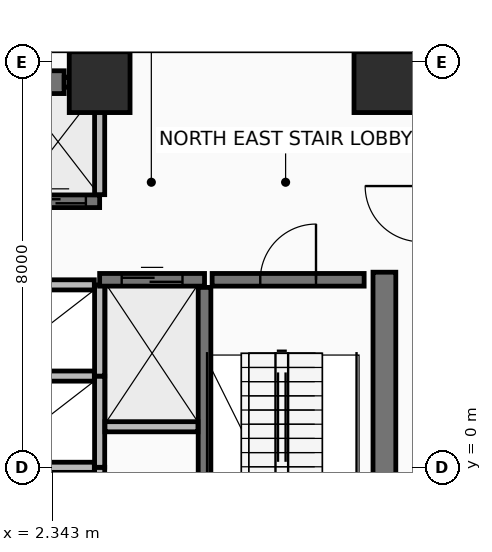
"""IFC4 building model, lengths in metres.
Left out: names, types, materials, properties, quantities, classifications, styles, units other than length and angle.
Written with IfcOpenShell. Run it as: python <this file> out.ifc"""

import sys

from ifc_helpers import new_model, si_unit, direction, frame, frame_2d, origin, origin_2d, place, context, subcontext, project, spatial, rectangle, extrude, element, fill, save


model = new_model("IFC4")
c1 = context("Model", 3, precision=1e-05, world=origin(), true_north=direction((0.0, 1.0)))
c2 = subcontext(c1, "Body", "Model", "MODEL_VIEW")
j1 = project(units=[si_unit("LENGTHUNIT", "METRE"), si_unit("PLANEANGLEUNIT", "RADIAN")], contexts=[c1])
p1 = place(None, origin())
s1 = spatial("IfcSite", under=j1, at=p1, CompositionType="ELEMENT")
p2 = place(p1, origin())
s2 = spatial("IfcBuilding", under=s1, at=p2, CompositionType="ELEMENT")
p3 = place(p2, frame((0.0, 0.0, 138.8)))
s3 = spatial("IfcBuildingStorey", under=s2, at=p3, CompositionType="ELEMENT", Elevation=138.8)
for number, where, z_axis, x_axis in (
    (1, (8.9, 7.6, 0.0), (0.0, 0.0, 1.0), (1.0, 0.0, 0.0)),
    (2, (3.28, 7.6, 0.0), (0.0, 0.0, 1.0), (1.0, 0.0, 0.0)),
):
    element("IfcColumn", number, at=place(p3, frame(where, z_axis=z_axis, x_axis=x_axis)), inside=s3, PredefinedType="COLUMN", context=c2, shape_type="SweptSolid", body=[
        extrude(rectangle(XDim=1.2, YDim=1.2, at=origin_2d()), origin(), (0.0, 0.0, 1.0), 3.6),
    ])
p4 = place(p3, frame((-2.8, 7.6, 0.0), z_axis=(0.0, 0.0, 1.0), x_axis=(1.0, 0.0, 0.0)))
e3 = element("IfcWall", 3, at=p4, inside=s3, PredefinedType="SHEAR", context=c2, shape_type="SweptSolid", body=[
    extrude(rectangle(XDim=5.38, YDim=0.45, at=frame_2d((2.69, 0.0))), origin(), (0.0, 0.0, 1.0), 3.41),
])
p5 = place(p3, frame((8.9, -6.85, 0.0), z_axis=(0.0, 0.0, 1.0), x_axis=(0.0, 1.0, 0.0)))
e4 = element("IfcWall", 4, at=p5, inside=s3, PredefinedType="SHEAR", context=c2, shape_type="SweptSolid", body=[
    extrude(rectangle(XDim=10.7, YDim=0.45, at=frame_2d((5.35, 0.0))), origin(), (0.0, 0.0, 1.0), 3.41),
])
p6 = place(p3, frame((5.35, -3.75, 0.0), z_axis=(0.0, 0.0, 1.0), x_axis=(0.0, 1.0, 0.0)))
e5 = element("IfcWall", 5, at=p6, inside=s3, PredefinedType="SHEAR", context=c2, shape_type="SweptSolid", body=[
    extrude(rectangle(XDim=7.3, YDim=0.25, at=frame_2d((3.65, 0.0))), origin(), (0.0, 0.0, 1.0), 3.41),
])
p7 = place(p3, frame((5.5, 3.7, 0.0), z_axis=(0.0, 0.0, 1.0), x_axis=(1.0, 0.0, 0.0)))
e6 = element("IfcWall", 6, at=p7, inside=s3, PredefinedType="SHEAR", context=c2, shape_type="SweptSolid", body=[
    extrude(rectangle(XDim=3.0, YDim=0.25, at=frame_2d((1.5, 0.0))), origin(), (0.0, 0.0, 1.0), 3.41),
])
p8 = place(p7, frame((0.95, 0.0, 0.0)))
e7 = element("IfcOpeningElement", 7, at=p8, cuts=e6, PredefinedType="OPENING", context=c2, shape_type="SweptSolid", body=[
    extrude(rectangle(XDim=1.1, YDim=2.15, at=frame_2d((0.55, 1.075))), frame((0.0, 0.135, 0.0), z_axis=(0.0, -1.0, 0.0), x_axis=(1.0, 0.0, 0.0)), (0.0, 0.0, 1.0), 0.27),
])
p9 = place(p3, frame((1.637, 5.25, 0.0), z_axis=(0.0, 0.0, 1.0), x_axis=(1.0, 0.0, 0.0)))
e8 = element("IfcWall", 8, at=p9, inside=s3, PredefinedType="SHEAR", context=c2, shape_type="SweptSolid", body=[
    extrude(rectangle(XDim=1.643, YDim=0.25, at=frame_2d((0.821, 0.0))), origin(), (0.0, 0.0, 1.0), 3.41),
])
p10 = place(p9, frame((0.271, 0.0, 0.0)))
e9 = element("IfcOpeningElement", 9, at=p10, cuts=e8, PredefinedType="OPENING", context=c2, shape_type="SweptSolid", body=[
    extrude(rectangle(XDim=1.1, YDim=2.2, at=frame_2d((0.55, 1.1))), frame((0.0, 0.135, 0.0), z_axis=(0.0, -1.0, 0.0), x_axis=(1.0, 0.0, 0.0)), (0.0, 0.0, 1.0), 0.27),
])
p11 = place(p3, frame((2.58, 7.6, 0.0), z_axis=(0.0, 0.0, 1.0), x_axis=(1.0, 0.0, 0.0)))
e10 = element("IfcWall", 10, at=p11, inside=s3, PredefinedType="PARTITIONING", context=c2, shape_type="SweptSolid", body=[
    extrude(rectangle(XDim=0.7, YDim=0.2, at=frame_2d((0.35, 0.0))), origin(), (0.0, 0.0, 1.0), 2.605),
])
p12 = place(p3, frame((3.28, 5.38, 0.0), z_axis=(0.0, 0.0, 1.0), x_axis=(0.0, 1.0, 0.0)))
e11 = element("IfcWall", 11, at=p12, inside=s3, PredefinedType="PARTITIONING", context=c2, shape_type="SweptSolid", body=[
    extrude(rectangle(XDim=2.115, YDim=0.2, at=frame_2d((1.058, 0.0))), origin(), (0.0, 0.0, 1.0), 2.605),
])
p13 = place(p3, frame((3.28, -1.8, 0.0), z_axis=(0.0, 0.0, 1.0), x_axis=(0.0, 1.0, 0.0)))
e12 = element("IfcWall", 12, at=p13, inside=s3, PredefinedType="PARTITIONING", context=c2, shape_type="SweptSolid", body=[
    extrude(rectangle(XDim=1.8, YDim=0.2, at=frame_2d((0.9, 0.0))), origin(), (0.0, 0.0, 1.0), 3.41),
])
p14 = place(p3, frame((1.13, 0.0, 0.0), z_axis=(0.0, 0.0, 1.0), x_axis=(1.0, 0.0, 0.0)))
e13 = element("IfcWall", 13, at=p14, inside=s3, PredefinedType="PARTITIONING", context=c2, shape_type="SweptSolid", body=[
    extrude(rectangle(XDim=2.045, YDim=0.2, at=frame_2d((1.022, 0.0))), origin(), (0.0, 0.0, 1.0), 3.41),
])
p15 = place(p3, frame((3.28, 0.0, 0.0), z_axis=(0.0, 0.0, 1.0), x_axis=(0.0, 1.0, 0.0)))
e14 = element("IfcWall", 14, at=p15, inside=s3, PredefinedType="PARTITIONING", context=c2, shape_type="SweptSolid", body=[
    extrude(rectangle(XDim=1.8, YDim=0.2, at=frame_2d((0.9, 0.0))), origin(), (0.0, 0.0, 1.0), 3.41),
])
p16 = place(p3, frame((1.13, 1.8, 0.0), z_axis=(0.0, 0.0, 1.0), x_axis=(1.0, 0.0, 0.0)))
e15 = element("IfcWall", 15, at=p16, inside=s3, PredefinedType="PARTITIONING", context=c2, shape_type="SweptSolid", body=[
    extrude(rectangle(XDim=2.045, YDim=0.2, at=frame_2d((1.022, 0.0))), origin(), (0.0, 0.0, 1.0), 3.41),
])
p17 = place(p3, frame((3.28, 1.8, 0.0), z_axis=(0.0, 0.0, 1.0), x_axis=(0.0, 1.0, 0.0)))
e16 = element("IfcWall", 16, at=p17, inside=s3, PredefinedType="PARTITIONING", context=c2, shape_type="SweptSolid", body=[
    extrude(rectangle(XDim=1.8, YDim=0.2, at=frame_2d((0.9, 0.0))), origin(), (0.0, 0.0, 1.0), 3.41),
])
p18 = place(p3, frame((1.13, 3.6, 0.0), z_axis=(0.0, 0.0, 1.0), x_axis=(1.0, 0.0, 0.0)))
e17 = element("IfcWall", 17, at=p18, inside=s3, PredefinedType="PARTITIONING", context=c2, shape_type="SweptSolid", body=[
    extrude(rectangle(XDim=2.045, YDim=0.2, at=frame_2d((1.022, 0.0))), origin(), (0.0, 0.0, 1.0), 2.605),
])
p19 = place(p3, frame((3.28, 3.7, 0.0), z_axis=(0.0, 0.0, 1.0), x_axis=(1.0, 0.0, 0.0)))
e18 = element("IfcWall", 18, at=p19, inside=s3, PredefinedType="SHEAR", context=c2, shape_type="SweptSolid", body=[
    extrude(rectangle(XDim=2.07, YDim=0.25, at=frame_2d((1.035, 0.0))), origin(), (0.0, 0.0, 1.0), 3.41),
])
p20 = place(p19, frame((0.435, 0.0, 0.0)))
e19 = element("IfcOpeningElement", 19, at=p20, cuts=e18, PredefinedType="OPENING", context=c2, shape_type="SweptSolid", body=[
    extrude(rectangle(XDim=1.2, YDim=2.2, at=frame_2d((0.6, 1.1))), frame((0.0, 0.135, 0.0), z_axis=(0.0, -1.0, 0.0), x_axis=(1.0, 0.0, 0.0)), (0.0, 0.0, 1.0), 0.27),
])
p21 = place(p3, frame((3.385, 0.8, 0.0), z_axis=(0.0, 0.0, 1.0), x_axis=(1.0, 0.0, 0.0)))
e20 = element("IfcWall", 20, at=p21, inside=s3, PredefinedType="PARTITIONING", context=c2, shape_type="SweptSolid", body=[
    extrude(rectangle(XDim=1.835, YDim=0.2, at=frame_2d((0.917, 0.0))), origin(), (0.0, 0.0, 1.0), 3.41),
])
p22 = place(p8, frame((1.1, 0.0, 0.0), z_axis=(0.0, 0.0, 1.0), x_axis=(-1.0, 0.0, 0.0)))
e21 = element("IfcDoor", 21, at=p22, inside=s3, OperationType="SINGLE_SWING_LEFT", PredefinedType="DOOR", context=c2, shape_type="SweptSolid", body=[
    extrude(rectangle(XDim=1.1, YDim=2.15, at=frame_2d((0.55, 1.075))), frame((0.0, 0.025, 0.0), z_axis=(0.0, -1.0, 0.0), x_axis=(1.0, 0.0, 0.0)), (0.0, 0.0, 1.0), 0.05),
])
fill(e7, e21)
p23 = place(p10, origin())
e22 = element("IfcDoor", 22, at=p23, inside=s3, OperationType="SLIDING_TO_LEFT", PredefinedType="DOOR", context=c2, shape_type="SweptSolid", body=[
    extrude(rectangle(XDim=1.1, YDim=2.2, at=frame_2d((0.55, 1.1))), frame((0.0, 0.025, 0.0), z_axis=(0.0, -1.0, 0.0), x_axis=(1.0, 0.0, 0.0)), (0.0, 0.0, 1.0), 0.05),
])
fill(e9, e22)
p24 = place(p20, origin())
e23 = element("IfcDoor", 23, at=p24, inside=s3, OperationType="SLIDING_TO_RIGHT", PredefinedType="DOOR", context=c2, shape_type="SweptSolid", body=[
    extrude(rectangle(XDim=1.2, YDim=2.2, at=frame_2d((0.6, 1.1))), frame((0.0, 0.025, 0.0), z_axis=(0.0, -1.0, 0.0), x_axis=(1.0, 0.0, 0.0)), (0.0, 0.0, 1.0), 0.05),
])
fill(e19, e23)
save(model, sys.argv[1])
